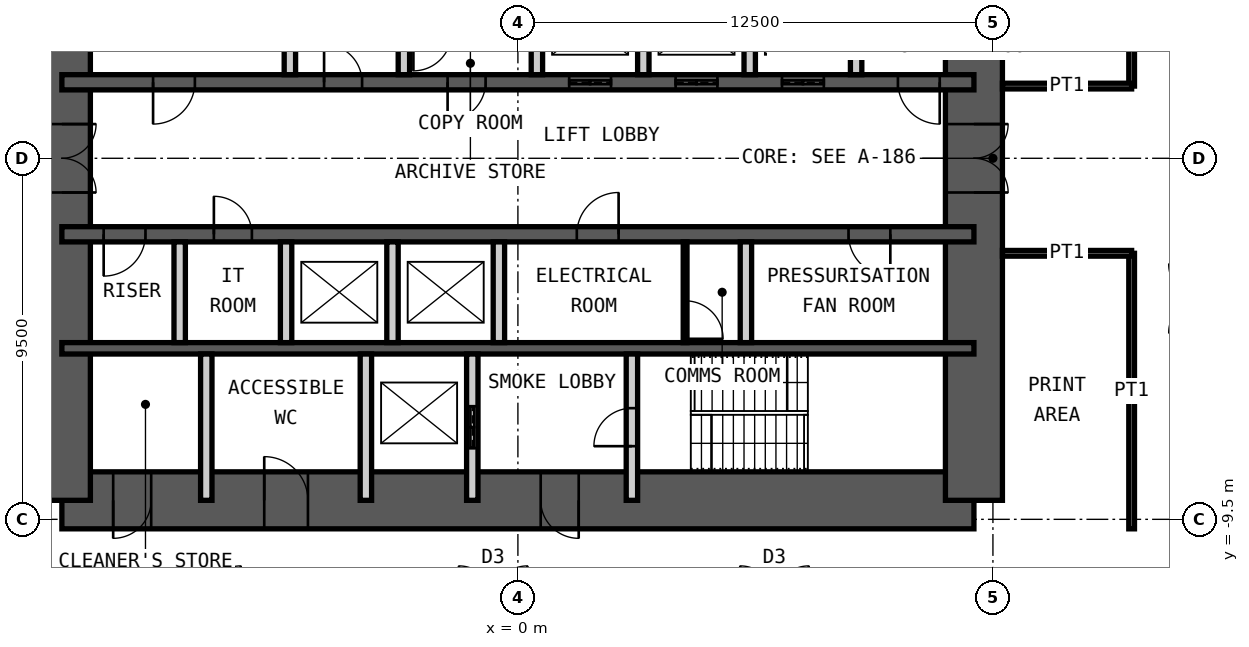
"""IFC4 building model, lengths in metres.
Left out: names, types, materials, properties, quantities, classifications, styles, units other than length and angle.
Written with IfcOpenShell. Run it as: python <this file> out.ifc"""

import sys

from ifc_helpers import new_model, si_unit, direction, frame, frame_2d, origin, place, context, subcontext, project, spatial, rectangle, extrude, element, fill, save


model = new_model("IFC4")
c1 = context("Model", 3, precision=1e-05, world=origin(), true_north=direction((0.0, 1.0)))
c2 = subcontext(c1, "Body", "Model", "MODEL_VIEW")
j1 = project(units=[si_unit("LENGTHUNIT", "METRE"), si_unit("PLANEANGLEUNIT", "RADIAN")], contexts=[c1])
p1 = place(None, origin())
s1 = spatial("IfcSite", under=j1, at=p1, CompositionType="ELEMENT")
p2 = place(p1, origin())
s2 = spatial("IfcBuilding", under=s1, at=p2, CompositionType="ELEMENT")
p3 = place(p2, frame((0.0, 0.0, 132.4)))
s3 = spatial("IfcBuildingStorey", under=s2, at=p3, CompositionType="ELEMENT", Elevation=132.4)
p4 = place(p3, frame((-12.0, -9.0, 0.0), z_axis=(0.0, 0.0, 1.0), x_axis=(1.0, 0.0, 0.0)))
e1 = element("IfcWall", 1, at=p4, inside=s3, PredefinedType="SHEAR", context=c2, shape_type="SweptSolid", body=[
    extrude(rectangle(XDim=24.0, YDim=1.5, at=frame_2d((12.0, 0.0))), origin(), (0.0, 0.0, 1.0), 4.2),
])
p5 = place(p4, frame((1.35, 0.0, 0.0)))
e2 = element("IfcOpeningElement", 2, at=p5, cuts=e1, PredefinedType="OPENING", context=c2, shape_type="SweptSolid", body=[
    extrude(rectangle(XDim=1.0, YDim=2.1, at=frame_2d((0.5, 1.05))), frame((0.0, 0.76, 0.0), z_axis=(0.0, -1.0, 0.0), x_axis=(1.0, 0.0, 0.0)), (0.0, 0.0, 1.0), 1.52),
])
p6 = place(p4, frame((5.325, 0.0, 0.0)))
e3 = element("IfcOpeningElement", 3, at=p6, cuts=e1, PredefinedType="OPENING", context=c2, shape_type="SweptSolid", body=[
    extrude(rectangle(XDim=1.15, YDim=2.1, at=frame_2d((0.575, 1.05))), frame((0.0, 0.76, 0.0), z_axis=(0.0, -1.0, 0.0), x_axis=(1.0, 0.0, 0.0)), (0.0, 0.0, 1.0), 1.52),
])
p7 = place(p4, frame((12.6, 0.0, 0.0)))
e4 = element("IfcOpeningElement", 4, at=p7, cuts=e1, PredefinedType="OPENING", context=c2, shape_type="SweptSolid", body=[
    extrude(rectangle(XDim=1.0, YDim=2.1, at=frame_2d((0.5, 1.05))), frame((0.0, 0.76, 0.0), z_axis=(0.0, -1.0, 0.0), x_axis=(1.0, 0.0, 0.0)), (0.0, 0.0, 1.0), 1.52),
])
p8 = place(p3, frame((12.0, -9.0, 0.0), z_axis=(0.0, 0.0, 1.0), x_axis=(0.0, 1.0, 0.0)))
e5 = element("IfcWall", 5, at=p8, inside=s3, PredefinedType="SHEAR", context=c2, shape_type="SweptSolid", body=[
    extrude(rectangle(XDim=18.0, YDim=1.5, at=frame_2d((9.0, 0.0))), origin(), (0.0, 0.0, 1.0), 4.2),
])
p9 = place(p8, frame((8.1, 0.0, 0.0)))
e6 = element("IfcOpeningElement", 6, at=p9, cuts=e5, PredefinedType="OPENING", context=c2, shape_type="SweptSolid", body=[
    extrude(rectangle(XDim=1.8, YDim=2.1, at=frame_2d((0.9, 1.05))), frame((0.0, 0.76, 0.0), z_axis=(0.0, -1.0, 0.0), x_axis=(1.0, 0.0, 0.0)), (0.0, 0.0, 1.0), 1.52),
])
p10 = place(p3, frame((-12.0, -9.0, 0.0), z_axis=(0.0, 0.0, 1.0), x_axis=(0.0, 1.0, 0.0)))
e7 = element("IfcWall", 7, at=p10, inside=s3, PredefinedType="SHEAR", context=c2, shape_type="SweptSolid", body=[
    extrude(rectangle(XDim=18.0, YDim=1.5, at=frame_2d((9.0, 0.0))), origin(), (0.0, 0.0, 1.0), 4.2),
])
p11 = place(p10, frame((8.1, 0.0, 0.0)))
e8 = element("IfcOpeningElement", 8, at=p11, cuts=e7, PredefinedType="OPENING", context=c2, shape_type="SweptSolid", body=[
    extrude(rectangle(XDim=1.8, YDim=2.1, at=frame_2d((0.9, 1.05))), frame((0.0, 0.76, 0.0), z_axis=(0.0, -1.0, 0.0), x_axis=(1.0, 0.0, 0.0)), (0.0, 0.0, 1.0), 1.52),
])
p12 = place(p3, frame((-12.0, 2.0, 0.0), z_axis=(0.0, 0.0, 1.0), x_axis=(1.0, 0.0, 0.0)))
e9 = element("IfcWall", 9, at=p12, inside=s3, PredefinedType="SHEAR", context=c2, shape_type="SweptSolid", body=[
    extrude(rectangle(XDim=24.0, YDim=0.4, at=frame_2d((12.0, 0.0))), origin(), (0.0, 0.0, 1.0), 4.2),
])
p13 = place(p12, frame((2.4, 0.0, 0.0)))
e10 = element("IfcOpeningElement", 10, at=p13, cuts=e9, PredefinedType="OPENING", context=c2, shape_type="SweptSolid", body=[
    extrude(rectangle(XDim=1.1, YDim=2.1, at=frame_2d((0.55, 1.05))), frame((0.0, 0.21, 0.0), z_axis=(0.0, -1.0, 0.0), x_axis=(1.0, 0.0, 0.0)), (0.0, 0.0, 1.0), 0.42),
])
p14 = place(p12, frame((22.0, 0.0, 0.0)))
e11 = element("IfcOpeningElement", 11, at=p14, cuts=e9, PredefinedType="OPENING", context=c2, shape_type="SweptSolid", body=[
    extrude(rectangle(XDim=1.1, YDim=2.1, at=frame_2d((0.55, 1.05))), frame((0.0, 0.21, 0.0), z_axis=(0.0, -1.0, 0.0), x_axis=(1.0, 0.0, 0.0)), (0.0, 0.0, 1.0), 0.42),
])
p15 = place(p12, frame((10.15, 0.0, 0.0)))
e12 = element("IfcOpeningElement", 12, at=p15, cuts=e9, PredefinedType="OPENING", context=c2, shape_type="SweptSolid", body=[
    extrude(rectangle(XDim=1.0, YDim=2.1, at=frame_2d((0.5, 1.05))), frame((0.0, 0.21, 0.0), z_axis=(0.0, -1.0, 0.0), x_axis=(1.0, 0.0, 0.0)), (0.0, 0.0, 1.0), 0.42),
])
p16 = place(p12, frame((6.9, 0.0, 0.0)))
e13 = element("IfcOpeningElement", 13, at=p16, cuts=e9, PredefinedType="OPENING", context=c2, shape_type="SweptSolid", body=[
    extrude(rectangle(XDim=1.0, YDim=2.1, at=frame_2d((0.5, 1.05))), frame((0.0, 0.21, 0.0), z_axis=(0.0, -1.0, 0.0), x_axis=(1.0, 0.0, 0.0)), (0.0, 0.0, 1.0), 0.42),
])
p17 = place(p12, frame((13.35, 0.0, 0.0)))
e14 = element("IfcOpeningElement", 14, at=p17, cuts=e9, PredefinedType="OPENING", context=c2, shape_type="SweptSolid", body=[
    extrude(rectangle(XDim=1.1, YDim=2.4, at=frame_2d((0.55, 1.2))), frame((0.0, 0.21, 0.0), z_axis=(0.0, -1.0, 0.0), x_axis=(1.0, 0.0, 0.0)), (0.0, 0.0, 1.0), 0.42),
])
p18 = place(p12, frame((16.15, 0.0, 0.0)))
e15 = element("IfcOpeningElement", 15, at=p18, cuts=e9, PredefinedType="OPENING", context=c2, shape_type="SweptSolid", body=[
    extrude(rectangle(XDim=1.1, YDim=2.4, at=frame_2d((0.55, 1.2))), frame((0.0, 0.21, 0.0), z_axis=(0.0, -1.0, 0.0), x_axis=(1.0, 0.0, 0.0)), (0.0, 0.0, 1.0), 0.42),
])
p19 = place(p12, frame((18.95, 0.0, 0.0)))
e16 = element("IfcOpeningElement", 16, at=p19, cuts=e9, PredefinedType="OPENING", context=c2, shape_type="SweptSolid", body=[
    extrude(rectangle(XDim=1.1, YDim=2.4, at=frame_2d((0.55, 1.2))), frame((0.0, 0.21, 0.0), z_axis=(0.0, -1.0, 0.0), x_axis=(1.0, 0.0, 0.0)), (0.0, 0.0, 1.0), 0.42),
])
p20 = place(p3, frame((-12.0, -2.0, 0.0), z_axis=(0.0, 0.0, 1.0), x_axis=(1.0, 0.0, 0.0)))
e17 = element("IfcWall", 17, at=p20, inside=s3, PredefinedType="SHEAR", context=c2, shape_type="SweptSolid", body=[
    extrude(rectangle(XDim=24.0, YDim=0.4, at=frame_2d((12.0, 0.0))), origin(), (0.0, 0.0, 1.0), 4.2),
])
p21 = place(p20, frame((1.1, 0.0, 0.0)))
e18 = element("IfcOpeningElement", 18, at=p21, cuts=e17, PredefinedType="OPENING", context=c2, shape_type="SweptSolid", body=[
    extrude(rectangle(XDim=1.1, YDim=2.1, at=frame_2d((0.55, 1.05))), frame((0.0, 0.21, 0.0), z_axis=(0.0, -1.0, 0.0), x_axis=(1.0, 0.0, 0.0)), (0.0, 0.0, 1.0), 0.42),
])
p22 = place(p20, frame((13.55, 0.0, 0.0)))
e19 = element("IfcOpeningElement", 19, at=p22, cuts=e17, PredefinedType="OPENING", context=c2, shape_type="SweptSolid", body=[
    extrude(rectangle(XDim=1.1, YDim=2.1, at=frame_2d((0.55, 1.05))), frame((0.0, 0.21, 0.0), z_axis=(0.0, -1.0, 0.0), x_axis=(1.0, 0.0, 0.0)), (0.0, 0.0, 1.0), 0.42),
])
p23 = place(p20, frame((20.7, 0.0, 0.0)))
e20 = element("IfcOpeningElement", 20, at=p23, cuts=e17, PredefinedType="OPENING", context=c2, shape_type="SweptSolid", body=[
    extrude(rectangle(XDim=1.1, YDim=2.1, at=frame_2d((0.55, 1.05))), frame((0.0, 0.21, 0.0), z_axis=(0.0, -1.0, 0.0), x_axis=(1.0, 0.0, 0.0)), (0.0, 0.0, 1.0), 0.42),
])
p24 = place(p20, frame((4.0, 0.0, 0.0)))
e21 = element("IfcOpeningElement", 21, at=p24, cuts=e17, PredefinedType="OPENING", context=c2, shape_type="SweptSolid", body=[
    extrude(rectangle(XDim=1.0, YDim=2.1, at=frame_2d((0.5, 1.05))), frame((0.0, 0.21, 0.0), z_axis=(0.0, -1.0, 0.0), x_axis=(1.0, 0.0, 0.0)), (0.0, 0.0, 1.0), 0.42),
])
p25 = place(p3, frame((-12.0, -5.0, 0.0), z_axis=(0.0, 0.0, 1.0), x_axis=(1.0, 0.0, 0.0)))
e22 = element("IfcWall", 22, at=p25, inside=s3, PredefinedType="SHEAR", context=c2, shape_type="SweptSolid", body=[
    extrude(rectangle(XDim=24.0, YDim=0.3, at=frame_2d((12.0, 0.0))), origin(), (0.0, 0.0, 1.0), 4.2),
])
for number, where, z_axis, x_axis in (
    (23, (-6.0, 2.2, 0.0), (0.0, 0.0, 1.0), (0.0, 1.0, 0.0)),
    (24, (-3.0, 2.2, 0.0), (0.0, 0.0, 1.0), (0.0, 1.0, 0.0)),
    (25, (0.5, 2.2, 0.0), (0.0, 0.0, 1.0), (0.0, 1.0, 0.0)),
    (26, (3.3, 2.2, 0.0), (0.0, 0.0, 1.0), (0.0, 1.0, 0.0)),
    (27, (6.1, 2.2, 0.0), (0.0, 0.0, 1.0), (0.0, 1.0, 0.0)),
    (28, (8.9, 2.2, 0.0), (0.0, 0.0, 1.0), (0.0, 1.0, 0.0)),
    (29, (-8.9, -4.85, 0.0), (0.0, 0.0, 1.0), (0.0, 1.0, 0.0)),
    (30, (-6.1, -4.85, 0.0), (0.0, 0.0, 1.0), (0.0, 1.0, 0.0)),
    (31, (-3.3, -4.85, 0.0), (0.0, 0.0, 1.0), (0.0, 1.0, 0.0)),
    (32, (-0.5, -4.85, 0.0), (0.0, 0.0, 1.0), (0.0, 1.0, 0.0)),
    (33, (6.0, -4.85, 0.0), (0.0, 0.0, 1.0), (0.0, 1.0, 0.0)),
):
    element("IfcWall", number, at=place(p3, frame(where, z_axis=z_axis, x_axis=x_axis)), inside=s3, PredefinedType="PARTITIONING", context=c2, shape_type="SweptSolid", body=[
        extrude(rectangle(XDim=2.65, YDim=0.3, at=frame_2d((1.325, 0.0))), origin(), (0.0, 0.0, 1.0), 3.98),
    ])
for number, where, z_axis, x_axis in (
    (34, (-8.2, -9.0, 0.0), (0.0, 0.0, 1.0), (0.0, 1.0, 0.0)),
    (35, (-4.0, -9.0, 0.0), (0.0, 0.0, 1.0), (0.0, 1.0, 0.0)),
):
    element("IfcWall", number, at=place(p3, frame(where, z_axis=z_axis, x_axis=x_axis)), inside=s3, PredefinedType="PARTITIONING", context=c2, shape_type="SweptSolid", body=[
        extrude(rectangle(XDim=3.85, YDim=0.3, at=frame_2d((1.925, 0.0))), origin(), (0.0, 0.0, 1.0), 3.98),
    ])
p26 = place(p3, frame((-1.2, -9.0, 0.0), z_axis=(0.0, 0.0, 1.0), x_axis=(0.0, 1.0, 0.0)))
e36 = element("IfcWall", 36, at=p26, inside=s3, PredefinedType="PARTITIONING", context=c2, shape_type="SweptSolid", body=[
    extrude(rectangle(XDim=3.85, YDim=0.3, at=frame_2d((1.925, 0.0))), origin(), (0.0, 0.0, 1.0), 3.98),
])
p27 = place(p26, frame((1.375, 0.0, 0.0)))
e37 = element("IfcOpeningElement", 37, at=p27, cuts=e36, PredefinedType="OPENING", context=c2, shape_type="SweptSolid", body=[
    extrude(rectangle(XDim=1.1, YDim=2.4, at=frame_2d((0.55, 1.2))), frame((0.0, 0.16, 0.0), z_axis=(0.0, -1.0, 0.0), x_axis=(1.0, 0.0, 0.0)), (0.0, 0.0, 1.0), 0.32),
])
p28 = place(p3, frame((3.0, -9.0, 0.0), z_axis=(0.0, 0.0, 1.0), x_axis=(0.0, 1.0, 0.0)))
e38 = element("IfcWall", 38, at=p28, inside=s3, PredefinedType="PARTITIONING", context=c2, shape_type="SweptSolid", body=[
    extrude(rectangle(XDim=3.85, YDim=0.3, at=frame_2d((1.925, 0.0))), origin(), (0.0, 0.0, 1.0), 3.98),
])
p29 = place(p28, frame((1.425, 0.0, 0.0)))
e39 = element("IfcOpeningElement", 39, at=p29, cuts=e38, PredefinedType="OPENING", context=c2, shape_type="SweptSolid", body=[
    extrude(rectangle(XDim=1.0, YDim=2.1, at=frame_2d((0.5, 1.05))), frame((0.0, 0.16, 0.0), z_axis=(0.0, -1.0, 0.0), x_axis=(1.0, 0.0, 0.0)), (0.0, 0.0, 1.0), 0.32),
])
p30 = place(p3, frame((4.4, -4.85, 0.0), z_axis=(0.0, 0.0, 1.0), x_axis=(0.0, 1.0, 0.0)))
e40 = element("IfcWall", 40, at=p30, inside=s3, PredefinedType="PARTITIONING", context=c2, shape_type="SweptSolid", body=[
    extrude(rectangle(XDim=2.65, YDim=0.1, at=frame_2d((1.325, 0.0))), origin(), (0.0, 0.0, 1.0), 3.98),
])
p31 = place(p30, frame((0.1, 0.0, 0.0)))
e41 = element("IfcOpeningElement", 41, at=p31, cuts=e40, PredefinedType="OPENING", context=c2, shape_type="SweptSolid", body=[
    extrude(rectangle(XDim=1.0, YDim=2.4, at=frame_2d((0.5, 1.2))), frame((0.0, 0.06, 0.0), z_axis=(0.0, -1.0, 0.0), x_axis=(1.0, 0.0, 0.0)), (0.0, 0.0, 1.0), 0.12),
])
p32 = place(p3, frame((16.15, 1.9, 0.0), z_axis=(0.0, 0.0, 1.0), x_axis=(0.0, 1.0, 0.0)))
e42 = element("IfcWall", 42, at=p32, inside=s3, PredefinedType="PARTITIONING", context=c2, shape_type="SweptSolid", body=[
    extrude(rectangle(XDim=7.85, YDim=0.15, at=frame_2d((3.925, 0.0))), origin(), (0.0, 0.0, 1.0), 4.03),
])
p33 = place(p3, frame((12.75, 1.9, 0.0), z_axis=(0.0, 0.0, 1.0), x_axis=(1.0, 0.0, 0.0)))
e43 = element("IfcWall", 43, at=p33, inside=s3, PredefinedType="PARTITIONING", context=c2, shape_type="SweptSolid", body=[
    extrude(rectangle(XDim=3.4, YDim=0.15, at=frame_2d((1.7, 0.0))), origin(), (0.0, 0.0, 1.0), 2.93),
])
p34 = place(p3, frame((16.15, -9.75, 0.0), z_axis=(0.0, 0.0, 1.0), x_axis=(0.0, 1.0, 0.0)))
e44 = element("IfcWall", 44, at=p34, inside=s3, PredefinedType="PARTITIONING", context=c2, shape_type="SweptSolid", body=[
    extrude(rectangle(XDim=7.25, YDim=0.15, at=frame_2d((3.625, 0.0))), origin(), (0.0, 0.0, 1.0), 4.03),
])
p35 = place(p3, frame((12.75, -2.5, 0.0), z_axis=(0.0, 0.0, 1.0), x_axis=(1.0, 0.0, 0.0)))
e45 = element("IfcWall", 45, at=p35, inside=s3, PredefinedType="PARTITIONING", context=c2, shape_type="SweptSolid", body=[
    extrude(rectangle(XDim=3.4, YDim=0.15, at=frame_2d((1.7, 0.0))), origin(), (0.0, 0.0, 1.0), 3.33),
])
p36 = place(p5, origin())
e46 = element("IfcDoor", 46, at=p36, inside=s3, OperationType="SINGLE_SWING_LEFT", PredefinedType="DOOR", context=c2, shape_type="SweptSolid", body=[
    extrude(rectangle(XDim=1.0, YDim=2.1, at=frame_2d((0.5, 1.05))), frame((0.0, 0.025, 0.0), z_axis=(0.0, -1.0, 0.0), x_axis=(1.0, 0.0, 0.0)), (0.0, 0.0, 1.0), 0.05),
])
fill(e2, e46)
p37 = place(p6, origin())
e47 = element("IfcDoor", 47, at=p37, inside=s3, OperationType="SINGLE_SWING_RIGHT", PredefinedType="DOOR", context=c2, shape_type="SweptSolid", body=[
    extrude(rectangle(XDim=1.15, YDim=2.1, at=frame_2d((0.575, 1.05))), frame((0.0, 0.025, 0.0), z_axis=(0.0, -1.0, 0.0), x_axis=(1.0, 0.0, 0.0)), (0.0, 0.0, 1.0), 0.05),
])
fill(e3, e47)
p38 = place(p7, origin())
e48 = element("IfcDoor", 48, at=p38, inside=s3, OperationType="SINGLE_SWING_RIGHT", PredefinedType="DOOR", context=c2, shape_type="SweptSolid", body=[
    extrude(rectangle(XDim=1.0, YDim=2.1, at=frame_2d((0.5, 1.05))), frame((0.0, 0.025, 0.0), z_axis=(0.0, -1.0, 0.0), x_axis=(1.0, 0.0, 0.0)), (0.0, 0.0, 1.0), 0.05),
])
fill(e4, e48)
p39 = place(p29, origin())
e49 = element("IfcDoor", 49, at=p39, inside=s3, OperationType="SINGLE_SWING_RIGHT", PredefinedType="DOOR", context=c2, shape_type="SweptSolid", body=[
    extrude(rectangle(XDim=1.0, YDim=2.1, at=frame_2d((0.5, 1.05))), frame((0.0, 0.025, 0.0), z_axis=(0.0, -1.0, 0.0), x_axis=(1.0, 0.0, 0.0)), (0.0, 0.0, 1.0), 0.05),
])
fill(e39, e49)
p40 = place(p13, origin())
e50 = element("IfcDoor", 50, at=p40, inside=s3, OperationType="SINGLE_SWING_LEFT", PredefinedType="DOOR", context=c2, shape_type="SweptSolid", body=[
    extrude(rectangle(XDim=1.1, YDim=2.1, at=frame_2d((0.55, 1.05))), frame((0.0, 0.025, 0.0), z_axis=(0.0, -1.0, 0.0), x_axis=(1.0, 0.0, 0.0)), (0.0, 0.0, 1.0), 0.05),
])
fill(e10, e50)
p41 = place(p21, origin())
e51 = element("IfcDoor", 51, at=p41, inside=s3, OperationType="SINGLE_SWING_LEFT", PredefinedType="DOOR", context=c2, shape_type="SweptSolid", body=[
    extrude(rectangle(XDim=1.1, YDim=2.1, at=frame_2d((0.55, 1.05))), frame((0.0, 0.025, 0.0), z_axis=(0.0, -1.0, 0.0), x_axis=(1.0, 0.0, 0.0)), (0.0, 0.0, 1.0), 0.05),
])
fill(e18, e51)
p42 = place(p14, origin())
e52 = element("IfcDoor", 52, at=p42, inside=s3, OperationType="SINGLE_SWING_RIGHT", PredefinedType="DOOR", context=c2, shape_type="SweptSolid", body=[
    extrude(rectangle(XDim=1.1, YDim=2.1, at=frame_2d((0.55, 1.05))), frame((0.0, 0.025, 0.0), z_axis=(0.0, -1.0, 0.0), x_axis=(1.0, 0.0, 0.0)), (0.0, 0.0, 1.0), 0.05),
])
fill(e11, e52)
p43 = place(p15, origin())
e53 = element("IfcDoor", 53, at=p43, inside=s3, OperationType="SINGLE_SWING_LEFT", PredefinedType="DOOR", context=c2, shape_type="SweptSolid", body=[
    extrude(rectangle(XDim=1.0, YDim=2.1, at=frame_2d((0.5, 1.05))), frame((0.0, 0.025, 0.0), z_axis=(0.0, -1.0, 0.0), x_axis=(1.0, 0.0, 0.0)), (0.0, 0.0, 1.0), 0.05),
])
fill(e12, e53)
p44 = place(p22, origin())
e54 = element("IfcDoor", 54, at=p44, inside=s3, OperationType="SINGLE_SWING_LEFT", PredefinedType="DOOR", context=c2, shape_type="SweptSolid", body=[
    extrude(rectangle(XDim=1.1, YDim=2.1, at=frame_2d((0.55, 1.05))), frame((0.0, 0.025, 0.0), z_axis=(0.0, -1.0, 0.0), x_axis=(1.0, 0.0, 0.0)), (0.0, 0.0, 1.0), 0.05),
])
fill(e19, e54)
p45 = place(p23, origin())
e55 = element("IfcDoor", 55, at=p45, inside=s3, OperationType="SINGLE_SWING_RIGHT", PredefinedType="DOOR", context=c2, shape_type="SweptSolid", body=[
    extrude(rectangle(XDim=1.1, YDim=2.1, at=frame_2d((0.55, 1.05))), frame((0.0, 0.025, 0.0), z_axis=(0.0, -1.0, 0.0), x_axis=(1.0, 0.0, 0.0)), (0.0, 0.0, 1.0), 0.05),
])
fill(e20, e55)
p46 = place(p9, origin())
e56 = element("IfcDoor", 56, at=p46, inside=s3, OperationType="DOUBLE_DOOR_DOUBLE_SWING", PredefinedType="DOOR", context=c2, shape_type="SweptSolid", body=[
    extrude(rectangle(XDim=1.8, YDim=2.1, at=frame_2d((0.9, 1.05))), frame((0.0, 0.025, 0.0), z_axis=(0.0, -1.0, 0.0), x_axis=(1.0, 0.0, 0.0)), (0.0, 0.0, 1.0), 0.05),
])
fill(e6, e56)
p47 = place(p11, origin())
e57 = element("IfcDoor", 57, at=p47, inside=s3, OperationType="DOUBLE_DOOR_DOUBLE_SWING", PredefinedType="DOOR", context=c2, shape_type="SweptSolid", body=[
    extrude(rectangle(XDim=1.8, YDim=2.1, at=frame_2d((0.9, 1.05))), frame((0.0, 0.025, 0.0), z_axis=(0.0, -1.0, 0.0), x_axis=(1.0, 0.0, 0.0)), (0.0, 0.0, 1.0), 0.05),
])
fill(e8, e57)
p48 = place(p27, origin())
e58 = element("IfcDoor", 58, at=p48, inside=s3, OperationType="DOUBLE_DOOR_SLIDING", PredefinedType="DOOR", context=c2, shape_type="SweptSolid", body=[
    extrude(rectangle(XDim=1.1, YDim=2.4, at=frame_2d((0.55, 1.2))), frame((0.0, 0.025, 0.0), z_axis=(0.0, -1.0, 0.0), x_axis=(1.0, 0.0, 0.0)), (0.0, 0.0, 1.0), 0.05),
])
fill(e37, e58)
p49 = place(p16, origin())
e59 = element("IfcDoor", 59, at=p49, inside=s3, OperationType="SINGLE_SWING_RIGHT", PredefinedType="DOOR", context=c2, shape_type="SweptSolid", body=[
    extrude(rectangle(XDim=1.0, YDim=2.1, at=frame_2d((0.5, 1.05))), frame((0.0, 0.025, 0.0), z_axis=(0.0, -1.0, 0.0), x_axis=(1.0, 0.0, 0.0)), (0.0, 0.0, 1.0), 0.05),
])
fill(e13, e59)
p50 = place(p17, origin())
e60 = element("IfcDoor", 60, at=p50, inside=s3, OperationType="DOUBLE_DOOR_SLIDING", PredefinedType="DOOR", context=c2, shape_type="SweptSolid", body=[
    extrude(rectangle(XDim=1.1, YDim=2.4, at=frame_2d((0.55, 1.2))), frame((0.0, 0.025, 0.0), z_axis=(0.0, -1.0, 0.0), x_axis=(1.0, 0.0, 0.0)), (0.0, 0.0, 1.0), 0.05),
])
fill(e14, e60)
p51 = place(p18, origin())
e61 = element("IfcDoor", 61, at=p51, inside=s3, OperationType="DOUBLE_DOOR_SLIDING", PredefinedType="DOOR", context=c2, shape_type="SweptSolid", body=[
    extrude(rectangle(XDim=1.1, YDim=2.4, at=frame_2d((0.55, 1.2))), frame((0.0, 0.025, 0.0), z_axis=(0.0, -1.0, 0.0), x_axis=(1.0, 0.0, 0.0)), (0.0, 0.0, 1.0), 0.05),
])
fill(e15, e61)
p52 = place(p19, origin())
e62 = element("IfcDoor", 62, at=p52, inside=s3, OperationType="DOUBLE_DOOR_SLIDING", PredefinedType="DOOR", context=c2, shape_type="SweptSolid", body=[
    extrude(rectangle(XDim=1.1, YDim=2.4, at=frame_2d((0.55, 1.2))), frame((0.0, 0.025, 0.0), z_axis=(0.0, -1.0, 0.0), x_axis=(1.0, 0.0, 0.0)), (0.0, 0.0, 1.0), 0.05),
])
fill(e16, e62)
p53 = place(p24, origin())
e63 = element("IfcDoor", 63, at=p53, inside=s3, OperationType="SINGLE_SWING_RIGHT", PredefinedType="DOOR", context=c2, shape_type="SweptSolid", body=[
    extrude(rectangle(XDim=1.0, YDim=2.1, at=frame_2d((0.5, 1.05))), frame((0.0, 0.025, 0.0), z_axis=(0.0, -1.0, 0.0), x_axis=(1.0, 0.0, 0.0)), (0.0, 0.0, 1.0), 0.05),
])
fill(e21, e63)
p54 = place(p31, origin())
e64 = element("IfcDoor", 64, at=p54, inside=s3, OperationType="SINGLE_SWING_LEFT", PredefinedType="DOOR", context=c2, shape_type="SweptSolid", body=[
    extrude(rectangle(XDim=1.0, YDim=2.4, at=frame_2d((0.5, 1.2))), frame((0.0, 0.025, 0.0), z_axis=(0.0, -1.0, 0.0), x_axis=(1.0, 0.0, 0.0)), (0.0, 0.0, 1.0), 0.05),
])
fill(e41, e64)
save(model, sys.argv[1])
